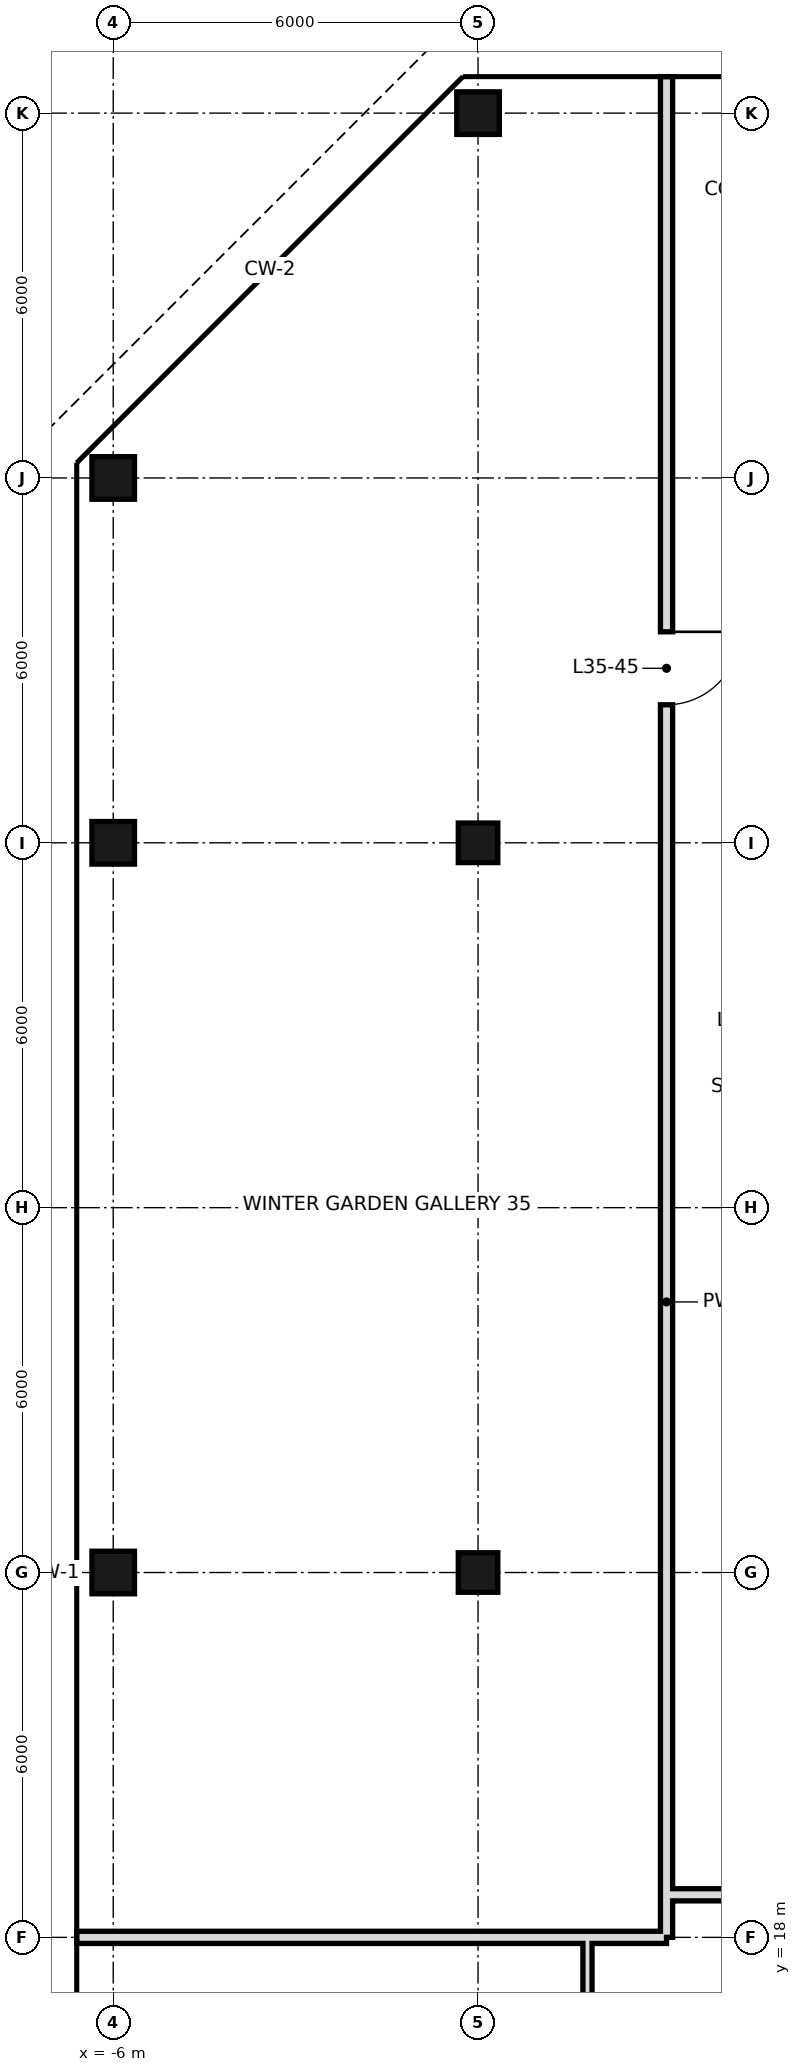
"""IFC4 building model, lengths in metres.
Left out: names, types, materials, properties, quantities, classifications, styles, units other than length and angle.
Written with IfcOpenShell. Run it as: python <this file> out.ifc"""

import sys

from ifc_helpers import new_model, si_unit, direction, frame, frame_2d, origin, origin_2d, place, context, subcontext, project, spatial, rectangle, hollow_rectangle, extrude, element, fill, save


model = new_model("IFC4")
c1 = context("Model", 3, precision=1e-05, world=origin(), true_north=direction((0.0, 1.0)))
c2 = subcontext(c1, "Body", "Model", "MODEL_VIEW")
j1 = project(units=[si_unit("LENGTHUNIT", "METRE"), si_unit("PLANEANGLEUNIT", "RADIAN")], contexts=[c1])
p1 = place(None, origin())
s1 = spatial("IfcSite", under=j1, at=p1, CompositionType="ELEMENT")
p2 = place(p1, origin())
s2 = spatial("IfcBuilding", under=s1, at=p2, CompositionType="ELEMENT")
p3 = place(p2, frame((0.0, 0.0, 154.6)))
s3 = spatial("IfcBuildingStorey", under=s2, at=p3, CompositionType="ELEMENT", Elevation=154.6)
for number, where, z_axis, x_axis in (
    (1, (-6.0, 24.0, 0.0), (0.0, 0.0, 1.0), (1.0, 0.0, 0.0)),
    (2, (-6.0, 36.0, 0.0), (0.0, 0.0, 1.0), (1.0, 0.0, 0.0)),
    (3, (-6.0, 42.0, 0.0), (0.0, 0.0, 1.0), (1.0, 0.0, 0.0)),
):
    element("IfcColumn", number, at=place(p3, frame(where, z_axis=z_axis, x_axis=x_axis)), inside=s3, PredefinedType="COLUMN", context=c2, shape_type="SweptSolid", body=[
        extrude(hollow_rectangle(XDim=0.7, YDim=0.7, WallThickness=0.036, at=origin_2d()), origin(), (0.0, 0.0, 1.0), 3.6),
    ])
for number, where, z_axis, x_axis in (
    (4, (0.0, 24.0, 0.0), (0.0, 0.0, 1.0), (1.0, 0.0, 0.0)),
    (5, (0.0, 36.0, 0.0), (0.0, 0.0, 1.0), (1.0, 0.0, 0.0)),
):
    element("IfcColumn", number, at=place(p3, frame(where, z_axis=z_axis, x_axis=x_axis)), inside=s3, PredefinedType="COLUMN", context=c2, shape_type="SweptSolid", body=[
        extrude(hollow_rectangle(XDim=0.65, YDim=0.65, WallThickness=0.032, at=origin_2d()), origin(), (0.0, 0.0, 1.0), 3.6),
    ])
p4 = place(p3, frame((0.0, 48.0, 0.0), z_axis=(0.0, 0.0, 1.0), x_axis=(1.0, 0.0, 0.0)))
e6 = element("IfcColumn", 6, at=p4, inside=s3, PredefinedType="COLUMN", context=c2, shape_type="SweptSolid", body=[
    extrude(hollow_rectangle(XDim=0.7, YDim=0.7, WallThickness=0.036, at=origin_2d()), origin(), (0.0, 0.0, 1.0), 3.6),
])
p5 = place(p3, frame((1.8, 10.8, 0.0), z_axis=(0.0, 0.0, 1.0), x_axis=(0.0, 1.0, 0.0)))
e7 = element("IfcWall", 7, at=p5, inside=s3, PredefinedType="PARTITIONING", context=c2, shape_type="SweptSolid", body=[
    extrude(rectangle(XDim=7.2, YDim=0.15, at=frame_2d((3.6, 0.0))), origin(), (0.0, 0.0, 1.0), 3.42),
])
p6 = place(p3, frame((3.1, 18.0, 0.0), z_axis=(0.0, 0.0, 1.0), x_axis=(0.0, 1.0, 0.0)))
e8 = element("IfcWall", 8, at=p6, inside=s3, PredefinedType="SOLIDWALL", context=c2, shape_type="SweptSolid", body=[
    extrude(rectangle(XDim=30.6, YDim=0.2, at=frame_2d((15.3, 0.0))), origin(), (0.0, 0.0, 1.0), 2.72),
])
p7 = place(p6, frame((20.27, 0.0, 0.0)))
e9 = element("IfcOpeningElement", 9, at=p7, cuts=e8, PredefinedType="OPENING", context=c2, shape_type="SweptSolid", body=[
    extrude(rectangle(XDim=1.2, YDim=2.4, at=frame_2d((0.6, 1.2))), frame((0.0, 0.11, 0.0), z_axis=(0.0, -1.0, 0.0), x_axis=(1.0, 0.0, 0.0)), (0.0, 0.0, 1.0), 0.22),
])
p8 = place(p3, frame((-6.6, 18.0, 0.0), z_axis=(0.0, 0.0, 1.0), x_axis=(1.0, 0.0, 0.0)))
e10 = element("IfcWall", 10, at=p8, inside=s3, PredefinedType="SOLIDWALL", context=c2, shape_type="SweptSolid", body=[
    extrude(rectangle(XDim=9.7, YDim=0.2, at=frame_2d((4.85, 0.0))), origin(), (0.0, 0.0, 1.0), 2.72),
])
p9 = place(p3, frame((3.1, 18.7, 0.0), z_axis=(0.0, 0.0, 1.0), x_axis=(1.0, 0.0, 0.0)))
e11 = element("IfcWall", 11, at=p9, inside=s3, PredefinedType="SOLIDWALL", context=c2, shape_type="SweptSolid", body=[
    extrude(rectangle(XDim=11.3, YDim=0.2, at=frame_2d((5.65, 0.0))), origin(), (0.0, 0.0, 1.0), 2.72),
])
p10 = place(p7, origin())
e12 = element("IfcDoor", 12, at=p10, inside=s3, OperationType="SINGLE_SWING_RIGHT", PredefinedType="DOOR", context=c2, shape_type="SweptSolid", body=[
    extrude(rectangle(XDim=1.2, YDim=2.4, at=frame_2d((0.6, 1.2))), frame((0.0, 0.025, 0.0), z_axis=(0.0, -1.0, 0.0), x_axis=(1.0, 0.0, 0.0)), (0.0, 0.0, 1.0), 0.05),
])
fill(e9, e12)
save(model, sys.argv[1])
